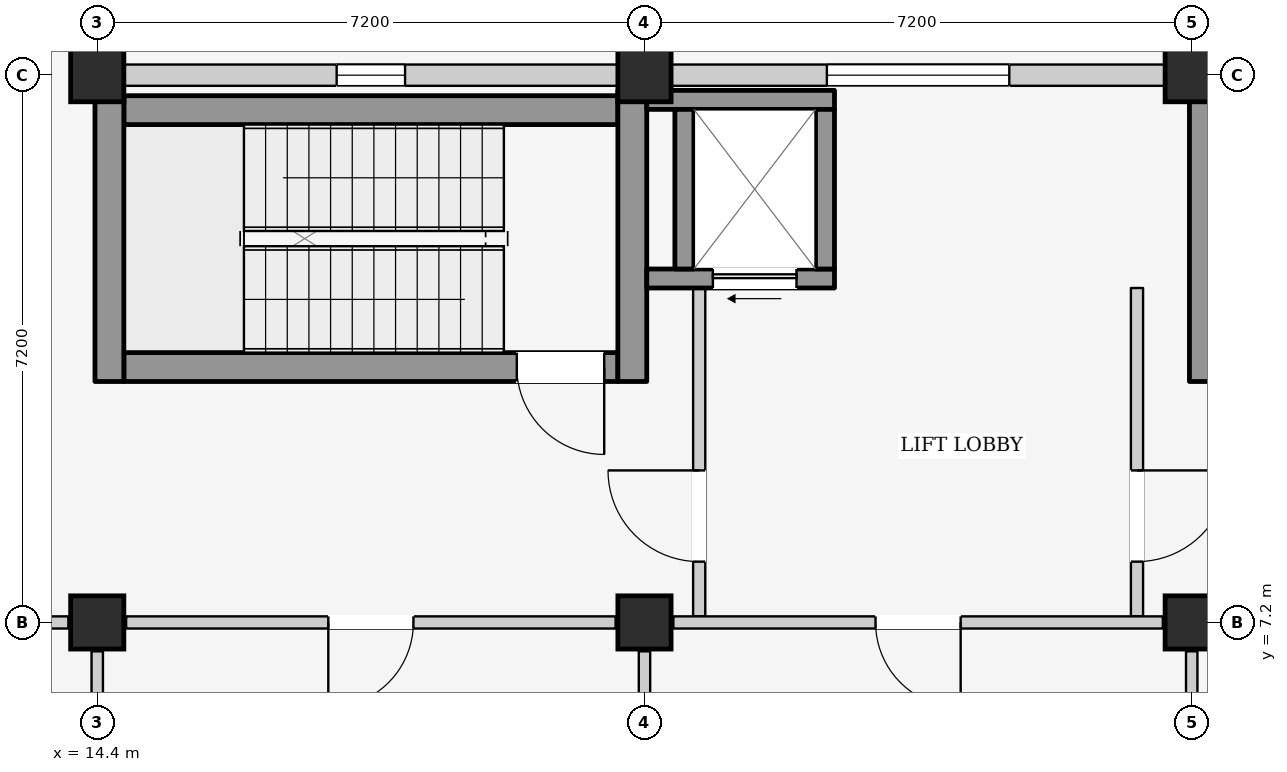
"""IFC4 building model, lengths in metres.
Left out: names, types, materials, properties, quantities, classifications, styles, units other than length and angle.
Written with IfcOpenShell. Run it as: python <this file> out.ifc"""

import sys

from ifc_helpers import new_model, si_unit, direction, frame, frame_2d, origin, origin_2d, place, context, subcontext, project, spatial, rectangle, extrude, element, fill, save


model = new_model("IFC4")
c1 = context("Model", 3, precision=1e-05, world=origin(), true_north=direction((0.0, 1.0)))
c2 = subcontext(c1, "Body", "Model", "MODEL_VIEW")
j1 = project(units=[si_unit("LENGTHUNIT", "METRE"), si_unit("PLANEANGLEUNIT", "RADIAN")], contexts=[c1])
p1 = place(None, origin())
s1 = spatial("IfcSite", under=j1, at=p1, CompositionType="ELEMENT")
p2 = place(p1, origin())
s2 = spatial("IfcBuilding", under=s1, at=p2, CompositionType="ELEMENT")
p3 = place(p2, origin())
s3 = spatial("IfcBuildingStorey", under=s2, at=p3, CompositionType="ELEMENT", Elevation=0.0)
for number, where, z_axis, x_axis in (
    (1, (14.4, 7.2, 0.0), (0.0, 0.0, 1.0), (1.0, 0.0, 0.0)),
    (2, (14.4, 14.4, 0.0), (0.0, 0.0, 1.0), (1.0, 0.0, 0.0)),
    (3, (21.6, 7.2, 0.0), (0.0, 0.0, 1.0), (1.0, 0.0, 0.0)),
    (4, (21.6, 14.4, 0.0), (0.0, 0.0, 1.0), (1.0, 0.0, 0.0)),
    (5, (28.8, 7.2, 0.0), (0.0, 0.0, 1.0), (1.0, 0.0, 0.0)),
    (6, (28.8, 14.4, 0.0), (0.0, 0.0, 1.0), (1.0, 0.0, 0.0)),
):
    element("IfcColumn", number, at=place(p3, frame(where, z_axis=z_axis, x_axis=x_axis)), inside=s3, PredefinedType="COLUMN", context=c2, shape_type="SweptSolid", body=[
        extrude(rectangle(XDim=0.7, YDim=0.7, at=origin_2d()), origin(), (0.0, 0.0, 1.0), 4.5),
    ])
p4 = place(p3, frame((14.75, 14.4, 0.0), z_axis=(0.0, 0.0, 1.0), x_axis=(1.0, 0.0, 0.0)))
e7 = element("IfcWall", 7, at=p4, inside=s3, PredefinedType="ELEMENTEDWALL", context=c2, shape_type="SweptSolid", body=[
    extrude(rectangle(XDim=6.5, YDim=0.28, at=frame_2d((3.25, 0.0))), origin(), (0.0, 0.0, 1.0), 3.435),
])
p5 = place(p4, frame((2.8, 0.0, 0.95)))
e8 = element("IfcOpeningElement", 8, at=p5, cuts=e7, PredefinedType="OPENING", context=c2, shape_type="SweptSolid", body=[
    extrude(rectangle(XDim=0.9, YDim=1.1, at=frame_2d((0.45, 0.55))), frame((0.0, 0.155, 0.0), z_axis=(0.0, -1.0, 0.0), x_axis=(1.0, 0.0, 0.0)), (0.0, 0.0, 1.0), 0.31),
])
p6 = place(p3, frame((21.95, 14.4, 0.0), z_axis=(0.0, 0.0, 1.0), x_axis=(1.0, 0.0, 0.0)))
e9 = element("IfcWall", 9, at=p6, inside=s3, PredefinedType="ELEMENTEDWALL", context=c2, shape_type="SweptSolid", body=[
    extrude(rectangle(XDim=6.5, YDim=0.28, at=frame_2d((3.25, 0.0))), origin(), (0.0, 0.0, 1.0), 3.435),
])
p7 = place(p6, frame((2.05, 0.0, 0.95)))
e10 = element("IfcOpeningElement", 10, at=p7, cuts=e9, PredefinedType="OPENING", context=c2, shape_type="SweptSolid", body=[
    extrude(rectangle(XDim=2.4, YDim=1.65, at=frame_2d((1.2, 0.825))), frame((0.0, 0.155, 0.0), z_axis=(0.0, -1.0, 0.0), x_axis=(1.0, 0.0, 0.0)), (0.0, 0.0, 1.0), 0.31),
])
p8 = place(p3, frame((14.75, 10.56, 0.0), z_axis=(0.0, 0.0, 1.0), x_axis=(1.0, 0.0, 0.0)))
e11 = element("IfcWall", 11, at=p8, inside=s3, PredefinedType="SHEAR", context=c2, shape_type="SweptSolid", body=[
    extrude(rectangle(XDim=6.5, YDim=0.38, at=frame_2d((3.25, 0.0))), origin(), (0.0, 0.0, 1.0), 4.2),
])
p9 = place(p8, frame((5.17, 0.0, 0.0)))
e12 = element("IfcOpeningElement", 12, at=p9, cuts=e11, PredefinedType="OPENING", context=c2, shape_type="SweptSolid", body=[
    extrude(rectangle(XDim=1.15, YDim=2.2, at=frame_2d((0.575, 1.1))), frame((0.0, 0.205, 0.0), z_axis=(0.0, -1.0, 0.0), x_axis=(1.0, 0.0, 0.0)), (0.0, 0.0, 1.0), 0.41),
])
p10 = place(p3, frame((14.75, 13.94, 0.0), z_axis=(0.0, 0.0, 1.0), x_axis=(1.0, 0.0, 0.0)))
e13 = element("IfcWall", 13, at=p10, inside=s3, PredefinedType="SHEAR", context=c2, shape_type="SweptSolid", body=[
    extrude(rectangle(XDim=6.5, YDim=0.38, at=frame_2d((3.25, 0.0))), origin(), (0.0, 0.0, 1.0), 4.2),
])
p11 = place(p3, frame((14.56, 10.37, 0.0), z_axis=(0.0, 0.0, 1.0), x_axis=(0.0, 1.0, 0.0)))
e14 = element("IfcWall", 14, at=p11, inside=s3, PredefinedType="SHEAR", context=c2, shape_type="SweptSolid", body=[
    extrude(rectangle(XDim=3.76, YDim=0.38, at=frame_2d((1.88, 0.0))), origin(), (0.0, 0.0, 1.0), 4.2),
])
p12 = place(p3, frame((21.44, 10.37, 0.0), z_axis=(0.0, 0.0, 1.0), x_axis=(0.0, 1.0, 0.0)))
e15 = element("IfcWall", 15, at=p12, inside=s3, PredefinedType="SHEAR", context=c2, shape_type="SweptSolid", body=[
    extrude(rectangle(XDim=3.83, YDim=0.38, at=frame_2d((1.915, 0.0))), origin(), (0.0, 0.0, 1.0), 4.2),
])
p13 = place(p3, frame((22.32, 7.28, 0.0), z_axis=(0.0, 0.0, 1.0), x_axis=(0.0, 1.0, 0.0)))
e16 = element("IfcWall", 16, at=p13, inside=s3, PredefinedType="PARTITIONING", context=c2, shape_type="SweptSolid", body=[
    extrude(rectangle(XDim=4.32, YDim=0.16, at=frame_2d((2.16, 0.0))), origin(), (0.0, 0.0, 1.0), 4.2),
])
p14 = place(p13, frame((0.72, 0.0, 0.0)))
e17 = element("IfcOpeningElement", 17, at=p14, cuts=e16, PredefinedType="OPENING", context=c2, shape_type="SweptSolid", body=[
    extrude(rectangle(XDim=1.2, YDim=2.2, at=frame_2d((0.6, 1.1))), frame((0.0, 0.095, 0.0), z_axis=(0.0, -1.0, 0.0), x_axis=(1.0, 0.0, 0.0)), (0.0, 0.0, 1.0), 0.19),
])
p15 = place(p3, frame((28.08, 7.28, 0.0), z_axis=(0.0, 0.0, 1.0), x_axis=(0.0, 1.0, 0.0)))
e18 = element("IfcWall", 18, at=p15, inside=s3, PredefinedType="PARTITIONING", context=c2, shape_type="SweptSolid", body=[
    extrude(rectangle(XDim=4.32, YDim=0.16, at=frame_2d((2.16, 0.0))), origin(), (0.0, 0.0, 1.0), 4.2),
])
p16 = place(p15, frame((0.72, 0.0, 0.0)))
e19 = element("IfcOpeningElement", 19, at=p16, cuts=e18, PredefinedType="OPENING", context=c2, shape_type="SweptSolid", body=[
    extrude(rectangle(XDim=1.2, YDim=2.2, at=frame_2d((0.6, 1.1))), frame((0.0, 0.095, 0.0), z_axis=(0.0, -1.0, 0.0), x_axis=(1.0, 0.0, 0.0)), (0.0, 0.0, 1.0), 0.19),
])
p17 = place(p3, frame((21.63, 11.725, 0.0), z_axis=(0.0, 0.0, 1.0), x_axis=(1.0, 0.0, 0.0)))
e20 = element("IfcWall", 20, at=p17, inside=s3, PredefinedType="SHEAR", context=c2, shape_type="SweptSolid", body=[
    extrude(rectangle(XDim=2.47, YDim=0.25, at=frame_2d((1.235, 0.0))), origin(), (0.0, 0.0, 1.0), 4.2),
])
p18 = place(p17, frame((0.87, 0.0, 0.0)))
e21 = element("IfcOpeningElement", 21, at=p18, cuts=e20, PredefinedType="OPENING", context=c2, shape_type="SweptSolid", body=[
    extrude(rectangle(XDim=1.1, YDim=2.15, at=frame_2d((0.55, 1.075))), frame((0.0, 0.14, 0.0), z_axis=(0.0, -1.0, 0.0), x_axis=(1.0, 0.0, 0.0)), (0.0, 0.0, 1.0), 0.28),
])
p19 = place(p3, frame((21.63, 14.075, 0.0), z_axis=(0.0, 0.0, 1.0), x_axis=(1.0, 0.0, 0.0)))
e22 = element("IfcWall", 22, at=p19, inside=s3, PredefinedType="SHEAR", context=c2, shape_type="SweptSolid", body=[
    extrude(rectangle(XDim=2.47, YDim=0.25, at=frame_2d((1.235, 0.0))), origin(), (0.0, 0.0, 1.0), 4.2),
])
for number, where, z_axis, x_axis in (
    (23, (22.125, 11.85, 0.0), (0.0, 0.0, 1.0), (0.0, 1.0, 0.0)),
    (24, (23.975, 11.85, 0.0), (0.0, 0.0, 1.0), (0.0, 1.0, 0.0)),
):
    element("IfcWall", number, at=place(p3, frame(where, z_axis=z_axis, x_axis=x_axis)), inside=s3, PredefinedType="SHEAR", context=c2, shape_type="SweptSolid", body=[
        extrude(rectangle(XDim=2.1, YDim=0.25, at=frame_2d((1.05, 0.0))), origin(), (0.0, 0.0, 1.0), 4.2),
    ])
p20 = place(p3, frame((28.96, 10.37, 0.0), z_axis=(0.0, 0.0, 1.0), x_axis=(0.0, 1.0, 0.0)))
e25 = element("IfcWall", 25, at=p20, inside=s3, PredefinedType="SHEAR", context=c2, shape_type="SweptSolid", body=[
    extrude(rectangle(XDim=3.76, YDim=0.38, at=frame_2d((1.88, 0.0))), origin(), (0.0, 0.0, 1.0), 4.2),
])
p21 = place(p3, frame((7.58, 7.2, 0.0), z_axis=(0.0, 0.0, 1.0), x_axis=(1.0, 0.0, 0.0)))
e26 = element("IfcWall", 26, at=p21, inside=s3, PredefinedType="PARTITIONING", context=c2, shape_type="SweptSolid", body=[
    extrude(rectangle(XDim=6.44, YDim=0.16, at=frame_2d((3.22, 0.0))), origin(), (0.0, 0.0, 1.0), 3.435),
])
p22 = place(p21, frame((2.66, 0.0, 0.0)))
e27 = element("IfcOpeningElement", 27, at=p22, cuts=e26, PredefinedType="OPENING", context=c2, shape_type="SweptSolid", body=[
    extrude(rectangle(XDim=1.12, YDim=2.2, at=frame_2d((0.56, 1.1))), frame((0.0, 0.095, 0.0), z_axis=(0.0, -1.0, 0.0), x_axis=(1.0, 0.0, 0.0)), (0.0, 0.0, 1.0), 0.19),
])
p23 = place(p3, frame((14.4, 0.38, 0.0), z_axis=(0.0, 0.0, 1.0), x_axis=(0.0, 1.0, 0.0)))
e28 = element("IfcWall", 28, at=p23, inside=s3, PredefinedType="PARTITIONING", context=c2, shape_type="SweptSolid", body=[
    extrude(rectangle(XDim=6.44, YDim=0.15, at=frame_2d((3.22, 0.0))), origin(), (0.0, 0.0, 1.0), 3.435),
])
p24 = place(p3, frame((14.78, 7.2, 0.0), z_axis=(0.0, 0.0, 1.0), x_axis=(1.0, 0.0, 0.0)))
e29 = element("IfcWall", 29, at=p24, inside=s3, PredefinedType="PARTITIONING", context=c2, shape_type="SweptSolid", body=[
    extrude(rectangle(XDim=6.44, YDim=0.16, at=frame_2d((3.22, 0.0))), origin(), (0.0, 0.0, 1.0), 3.435),
])
p25 = place(p24, frame((2.66, 0.0, 0.0)))
e30 = element("IfcOpeningElement", 30, at=p25, cuts=e29, PredefinedType="OPENING", context=c2, shape_type="SweptSolid", body=[
    extrude(rectangle(XDim=1.12, YDim=2.2, at=frame_2d((0.56, 1.1))), frame((0.0, 0.095, 0.0), z_axis=(0.0, -1.0, 0.0), x_axis=(1.0, 0.0, 0.0)), (0.0, 0.0, 1.0), 0.19),
])
p26 = place(p3, frame((21.6, 0.38, 0.0), z_axis=(0.0, 0.0, 1.0), x_axis=(0.0, 1.0, 0.0)))
e31 = element("IfcWall", 31, at=p26, inside=s3, PredefinedType="PARTITIONING", context=c2, shape_type="SweptSolid", body=[
    extrude(rectangle(XDim=6.44, YDim=0.15, at=frame_2d((3.22, 0.0))), origin(), (0.0, 0.0, 1.0), 3.435),
])
p27 = place(p3, frame((21.98, 7.2, 0.0), z_axis=(0.0, 0.0, 1.0), x_axis=(1.0, 0.0, 0.0)))
e32 = element("IfcWall", 32, at=p27, inside=s3, PredefinedType="PARTITIONING", context=c2, shape_type="SweptSolid", body=[
    extrude(rectangle(XDim=6.44, YDim=0.16, at=frame_2d((3.22, 0.0))), origin(), (0.0, 0.0, 1.0), 3.435),
])
p28 = place(p27, frame((2.66, 0.0, 0.0)))
e33 = element("IfcOpeningElement", 33, at=p28, cuts=e32, PredefinedType="OPENING", context=c2, shape_type="SweptSolid", body=[
    extrude(rectangle(XDim=1.12, YDim=2.2, at=frame_2d((0.56, 1.1))), frame((0.0, 0.095, 0.0), z_axis=(0.0, -1.0, 0.0), x_axis=(1.0, 0.0, 0.0)), (0.0, 0.0, 1.0), 0.19),
])
p29 = place(p3, frame((28.8, 0.38, 0.0), z_axis=(0.0, 0.0, 1.0), x_axis=(0.0, 1.0, 0.0)))
e34 = element("IfcWall", 34, at=p29, inside=s3, PredefinedType="PARTITIONING", context=c2, shape_type="SweptSolid", body=[
    extrude(rectangle(XDim=6.44, YDim=0.15, at=frame_2d((3.22, 0.0))), origin(), (0.0, 0.0, 1.0), 3.435),
])
p30 = place(p5, origin())
e35 = element("IfcWindow", 35, at=p30, inside=s3, PartitioningType="SINGLE_PANEL", PredefinedType="WINDOW", context=c2, shape_type="SweptSolid", body=[
    extrude(rectangle(XDim=0.9, YDim=1.1, at=frame_2d((0.45, 0.55))), frame((0.0, 0.03, 0.0), z_axis=(0.0, -1.0, 0.0), x_axis=(1.0, 0.0, 0.0)), (0.0, 0.0, 1.0), 0.06),
])
fill(e8, e35)
p31 = place(p7, origin())
e36 = element("IfcWindow", 36, at=p31, inside=s3, PartitioningType="TRIPLE_PANEL_VERTICAL", PredefinedType="WINDOW", context=c2, shape_type="SweptSolid", body=[
    extrude(rectangle(XDim=2.4, YDim=1.65, at=frame_2d((1.2, 0.825))), frame((0.0, 0.03, 0.0), z_axis=(0.0, -1.0, 0.0), x_axis=(1.0, 0.0, 0.0)), (0.0, 0.0, 1.0), 0.06),
])
fill(e10, e36)
p32 = place(p9, frame((1.15, 0.0, 0.0), z_axis=(0.0, 0.0, 1.0), x_axis=(-1.0, 0.0, 0.0)))
e37 = element("IfcDoor", 37, at=p32, inside=s3, OperationType="SINGLE_SWING_LEFT", PredefinedType="DOOR", context=c2, shape_type="SweptSolid", body=[
    extrude(rectangle(XDim=1.15, YDim=2.2, at=frame_2d((0.575, 1.1))), frame((0.0, 0.025, 0.0), z_axis=(0.0, -1.0, 0.0), x_axis=(1.0, 0.0, 0.0)), (0.0, 0.0, 1.0), 0.05),
])
fill(e12, e37)
p33 = place(p14, origin())
e38 = element("IfcDoor", 38, at=p33, inside=s3, OperationType="SINGLE_SWING_RIGHT", PredefinedType="DOOR", context=c2, shape_type="SweptSolid", body=[
    extrude(rectangle(XDim=1.2, YDim=2.2, at=frame_2d((0.6, 1.1))), frame((0.0, 0.025, 0.0), z_axis=(0.0, -1.0, 0.0), x_axis=(1.0, 0.0, 0.0)), (0.0, 0.0, 1.0), 0.05),
])
fill(e17, e38)
p34 = place(p16, frame((1.2, 0.0, 0.0), z_axis=(0.0, 0.0, 1.0), x_axis=(-1.0, 0.0, 0.0)))
e39 = element("IfcDoor", 39, at=p34, inside=s3, OperationType="SINGLE_SWING_LEFT", PredefinedType="DOOR", context=c2, shape_type="SweptSolid", body=[
    extrude(rectangle(XDim=1.2, YDim=2.2, at=frame_2d((0.6, 1.1))), frame((0.0, 0.025, 0.0), z_axis=(0.0, -1.0, 0.0), x_axis=(1.0, 0.0, 0.0)), (0.0, 0.0, 1.0), 0.05),
])
fill(e19, e39)
p35 = place(p18, frame((1.1, 0.0, 0.0), z_axis=(0.0, 0.0, 1.0), x_axis=(-1.0, 0.0, 0.0)))
e40 = element("IfcDoor", 40, at=p35, inside=s3, OperationType="SLIDING_TO_LEFT", PredefinedType="DOOR", context=c2, shape_type="SweptSolid", body=[
    extrude(rectangle(XDim=1.1, YDim=2.15, at=frame_2d((0.55, 1.075))), frame((0.0, 0.025, 0.0), z_axis=(0.0, -1.0, 0.0), x_axis=(1.0, 0.0, 0.0)), (0.0, 0.0, 1.0), 0.05),
])
fill(e21, e40)
p36 = place(p25, frame((1.12, 0.0, 0.0), z_axis=(0.0, 0.0, 1.0), x_axis=(-1.0, 0.0, 0.0)))
e41 = element("IfcDoor", 41, at=p36, inside=s3, OperationType="SINGLE_SWING_RIGHT", PredefinedType="DOOR", context=c2, shape_type="SweptSolid", body=[
    extrude(rectangle(XDim=1.12, YDim=2.2, at=frame_2d((0.56, 1.1))), frame((0.0, 0.025, 0.0), z_axis=(0.0, -1.0, 0.0), x_axis=(1.0, 0.0, 0.0)), (0.0, 0.0, 1.0), 0.05),
])
fill(e30, e41)
p37 = place(p28, frame((1.12, 0.0, 0.0), z_axis=(0.0, 0.0, 1.0), x_axis=(-1.0, 0.0, 0.0)))
e42 = element("IfcDoor", 42, at=p37, inside=s3, OperationType="SINGLE_SWING_LEFT", PredefinedType="DOOR", context=c2, shape_type="SweptSolid", body=[
    extrude(rectangle(XDim=1.12, YDim=2.2, at=frame_2d((0.56, 1.1))), frame((0.0, 0.025, 0.0), z_axis=(0.0, -1.0, 0.0), x_axis=(1.0, 0.0, 0.0)), (0.0, 0.0, 1.0), 0.05),
])
fill(e33, e42)
save(model, sys.argv[1])
